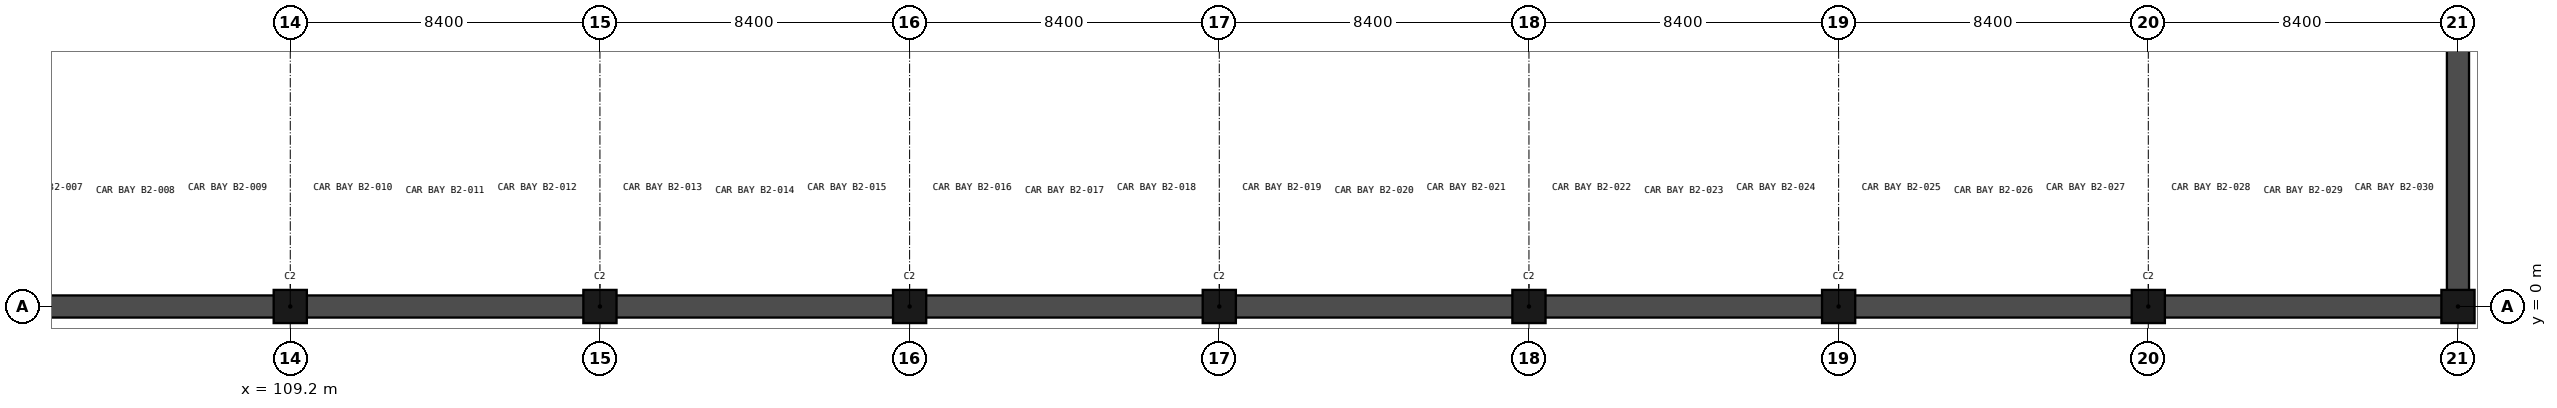
"""IFC4 building model, lengths in metres.
Left out: names, types, materials, properties, quantities, classifications, styles, units other than length and angle.
Written with IfcOpenShell. Run it as: python <this file> out.ifc"""

import sys

from ifc_helpers import new_model, si_unit, direction, frame, frame_2d, origin, origin_2d, place, context, subcontext, project, spatial, rectangle, extrude, element, save


model = new_model("IFC4")
c1 = context("Model", 3, precision=1e-05, world=origin(), true_north=direction((0.0, 1.0)))
c2 = subcontext(c1, "Body", "Model", "MODEL_VIEW")
j1 = project(units=[si_unit("LENGTHUNIT", "METRE"), si_unit("PLANEANGLEUNIT", "RADIAN")], contexts=[c1])
p1 = place(None, origin())
s1 = spatial("IfcSite", under=j1, at=p1, CompositionType="ELEMENT")
p2 = place(p1, origin())
s2 = spatial("IfcBuilding", under=s1, at=p2, CompositionType="ELEMENT")
p3 = place(p2, frame((0.0, 0.0, -9.6)))
s3 = spatial("IfcBuildingStorey", under=s2, at=p3, CompositionType="ELEMENT", Elevation=-9.6)
for number, where, z_axis, x_axis in (
    (1, (109.2, 0.0, -0.25), (0.0, 0.0, 1.0), (1.0, 0.0, 0.0)),
    (2, (117.6, 0.0, -0.25), (0.0, 0.0, 1.0), (1.0, 0.0, 0.0)),
    (3, (126.0, 0.0, -0.25), (0.0, 0.0, 1.0), (1.0, 0.0, 0.0)),
    (4, (134.4, 0.0, -0.25), (0.0, 0.0, 1.0), (1.0, 0.0, 0.0)),
    (5, (142.8, 0.0, -0.25), (0.0, 0.0, 1.0), (1.0, 0.0, 0.0)),
    (6, (151.2, 0.0, -0.25), (0.0, 0.0, 1.0), (1.0, 0.0, 0.0)),
    (7, (159.6, 0.0, -0.25), (0.0, 0.0, 1.0), (1.0, 0.0, 0.0)),
    (8, (168.0, 0.0, -0.25), (0.0, 0.0, 1.0), (1.0, 0.0, 0.0)),
):
    element("IfcColumn", number, at=place(p3, frame(where, z_axis=z_axis, x_axis=x_axis)), inside=s3, PredefinedType="COLUMN", context=c2, shape_type="SweptSolid", body=[
        extrude(rectangle(XDim=0.9, YDim=0.9, at=origin_2d()), origin(), (0.0, 0.0, 1.0), 4.75),
    ])
p4 = place(p3, frame((83.7, 0.0, -0.25), z_axis=(0.0, 0.0, 1.0), x_axis=(1.0, 0.0, 0.0)))
e9 = element("IfcWall", 9, at=p4, inside=s3, PredefinedType="SOLIDWALL", context=c2, shape_type="SweptSolid", body=[
    extrude(rectangle(XDim=84.6, YDim=0.6, at=frame_2d((42.3, 0.0))), origin(), (0.0, 0.0, 1.0), 4.75),
])
p5 = place(p3, frame((168.0, -0.3, -0.25), z_axis=(0.0, 0.0, 1.0), x_axis=(0.0, 1.0, 0.0)))
e10 = element("IfcWall", 10, at=p5, inside=s3, PredefinedType="SOLIDWALL", context=c2, shape_type="SweptSolid", body=[
    extrude(rectangle(XDim=118.2, YDim=0.6, at=frame_2d((59.1, 0.0))), origin(), (0.0, 0.0, 1.0), 4.75),
])
save(model, sys.argv[1])
